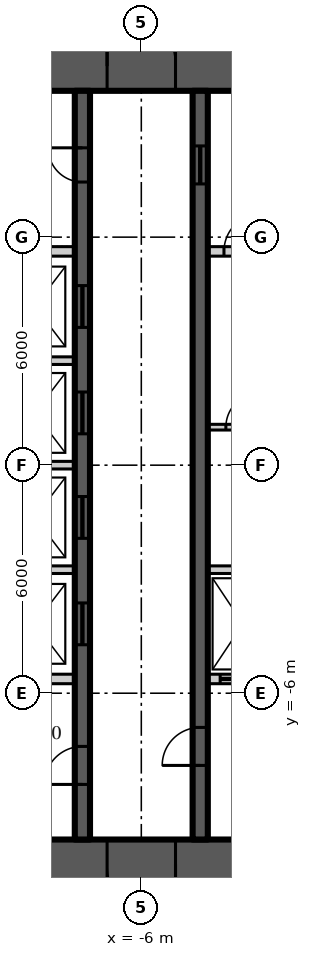
"""IFC4 building model, lengths in metres.
Left out: names, types, materials, properties, quantities, classifications, styles, units other than length and angle.
Written with IfcOpenShell. Run it as: python <this file> out.ifc"""

import sys

from ifc_helpers import new_model, si_unit, direction, frame, frame_2d, origin, place, context, subcontext, project, spatial, rectangle, extrude, element, fill, save


model = new_model("IFC4")
c1 = context("Model", 3, precision=1e-05, world=origin(), true_north=direction((0.0, 1.0)))
c2 = subcontext(c1, "Body", "Model", "MODEL_VIEW")
j1 = project(units=[si_unit("LENGTHUNIT", "METRE"), si_unit("PLANEANGLEUNIT", "RADIAN")], contexts=[c1])
p1 = place(None, origin())
s1 = spatial("IfcSite", under=j1, at=p1, CompositionType="ELEMENT")
p2 = place(p1, origin())
s2 = spatial("IfcBuilding", under=s1, at=p2, CompositionType="ELEMENT")
p3 = place(p2, frame((0.0, 0.0, 43.5)))
s3 = spatial("IfcBuildingStorey", under=s2, at=p3, CompositionType="ELEMENT", Elevation=43.5)
p4 = place(p3, frame((-11.15, 10.5, 0.0), z_axis=(0.0, 0.0, 1.0), x_axis=(1.0, 0.0, 0.0)))
e1 = element("IfcWall", 1, at=p4, inside=s3, PredefinedType="SHEAR", context=c2, shape_type="SweptSolid", body=[
    extrude(rectangle(XDim=22.3, YDim=1.3, at=frame_2d((11.15, 0.0))), origin(), (0.0, 0.0, 1.0), 3.9),
])
p5 = place(p4, frame((4.25, 0.0, 0.0)))
e2 = element("IfcOpeningElement", 2, at=p5, cuts=e1, PredefinedType="OPENING", context=c2, shape_type="SweptSolid", body=[
    extrude(rectangle(XDim=1.8, YDim=2.2, at=frame_2d((0.9, 1.1))), frame((0.0, 0.66, 0.0), z_axis=(0.0, -1.0, 0.0), x_axis=(1.0, 0.0, 0.0)), (0.0, 0.0, 1.0), 1.32),
])
p6 = place(p4, frame((16.25, 0.0, 0.0)))
e3 = element("IfcOpeningElement", 3, at=p6, cuts=e1, PredefinedType="OPENING", context=c2, shape_type="SweptSolid", body=[
    extrude(rectangle(XDim=1.8, YDim=2.2, at=frame_2d((0.9, 1.1))), frame((0.0, 0.66, 0.0), z_axis=(0.0, -1.0, 0.0), x_axis=(1.0, 0.0, 0.0)), (0.0, 0.0, 1.0), 1.32),
])
p7 = place(p3, frame((11.15, -10.5, 0.0), z_axis=(0.0, 0.0, 1.0), x_axis=(-1.0, 0.0, 0.0)))
e4 = element("IfcWall", 4, at=p7, inside=s3, PredefinedType="SHEAR", context=c2, shape_type="SweptSolid", body=[
    extrude(rectangle(XDim=22.3, YDim=1.3, at=frame_2d((11.15, 0.0))), origin(), (0.0, 0.0, 1.0), 3.9),
])
p8 = place(p7, frame((16.25, 0.0, 0.0)))
e5 = element("IfcOpeningElement", 5, at=p8, cuts=e4, PredefinedType="OPENING", context=c2, shape_type="SweptSolid", body=[
    extrude(rectangle(XDim=1.8, YDim=2.2, at=frame_2d((0.9, 1.1))), frame((0.0, 0.66, 0.0), z_axis=(0.0, -1.0, 0.0), x_axis=(1.0, 0.0, 0.0)), (0.0, 0.0, 1.0), 1.32),
])
p9 = place(p7, frame((4.25, 0.0, 0.0)))
e6 = element("IfcOpeningElement", 6, at=p9, cuts=e4, PredefinedType="OPENING", context=c2, shape_type="SweptSolid", body=[
    extrude(rectangle(XDim=1.8, YDim=2.2, at=frame_2d((0.9, 1.1))), frame((0.0, 0.66, 0.0), z_axis=(0.0, -1.0, 0.0), x_axis=(1.0, 0.0, 0.0)), (0.0, 0.0, 1.0), 1.32),
])
p10 = place(p3, frame((-7.55, -9.85, 0.0), z_axis=(0.0, 0.0, 1.0), x_axis=(0.0, 1.0, 0.0)))
e7 = element("IfcWall", 7, at=p10, inside=s3, PredefinedType="SHEAR", context=c2, shape_type="SweptSolid", body=[
    extrude(rectangle(XDim=19.7, YDim=0.4, at=frame_2d((9.85, 0.0))), origin(), (0.0, 0.0, 1.0), 3.9),
])
p11 = place(p10, frame((1.45, 0.0, 0.0)))
e8 = element("IfcOpeningElement", 8, at=p11, cuts=e7, PredefinedType="OPENING", context=c2, shape_type="SweptSolid", body=[
    extrude(rectangle(XDim=1.0, YDim=2.2, at=frame_2d((0.5, 1.1))), frame((0.0, 0.21, 0.0), z_axis=(0.0, -1.0, 0.0), x_axis=(1.0, 0.0, 0.0)), (0.0, 0.0, 1.0), 0.42),
])
p12 = place(p10, frame((17.3, 0.0, 0.0)))
e9 = element("IfcOpeningElement", 9, at=p12, cuts=e7, PredefinedType="OPENING", context=c2, shape_type="SweptSolid", body=[
    extrude(rectangle(XDim=0.9, YDim=2.1, at=frame_2d((0.45, 1.05))), frame((0.0, 0.21, 0.0), z_axis=(0.0, -1.0, 0.0), x_axis=(1.0, 0.0, 0.0)), (0.0, 0.0, 1.0), 0.42),
])
p13 = place(p10, frame((5.125, 0.0, 0.0)))
e10 = element("IfcOpeningElement", 10, at=p13, cuts=e7, PredefinedType="OPENING", context=c2, shape_type="SweptSolid", body=[
    extrude(rectangle(XDim=1.1, YDim=2.2, at=frame_2d((0.55, 1.1))), frame((0.0, 0.21, 0.0), z_axis=(0.0, -1.0, 0.0), x_axis=(1.0, 0.0, 0.0)), (0.0, 0.0, 1.0), 0.42),
])
p14 = place(p10, frame((7.925, 0.0, 0.0)))
e11 = element("IfcOpeningElement", 11, at=p14, cuts=e7, PredefinedType="OPENING", context=c2, shape_type="SweptSolid", body=[
    extrude(rectangle(XDim=1.1, YDim=2.2, at=frame_2d((0.55, 1.1))), frame((0.0, 0.21, 0.0), z_axis=(0.0, -1.0, 0.0), x_axis=(1.0, 0.0, 0.0)), (0.0, 0.0, 1.0), 0.42),
])
p15 = place(p10, frame((10.675, 0.0, 0.0)))
e12 = element("IfcOpeningElement", 12, at=p15, cuts=e7, PredefinedType="OPENING", context=c2, shape_type="SweptSolid", body=[
    extrude(rectangle(XDim=1.1, YDim=2.2, at=frame_2d((0.55, 1.1))), frame((0.0, 0.21, 0.0), z_axis=(0.0, -1.0, 0.0), x_axis=(1.0, 0.0, 0.0)), (0.0, 0.0, 1.0), 0.42),
])
p16 = place(p10, frame((13.475, 0.0, 0.0)))
e13 = element("IfcOpeningElement", 13, at=p16, cuts=e7, PredefinedType="OPENING", context=c2, shape_type="SweptSolid", body=[
    extrude(rectangle(XDim=1.1, YDim=2.2, at=frame_2d((0.55, 1.1))), frame((0.0, 0.21, 0.0), z_axis=(0.0, -1.0, 0.0), x_axis=(1.0, 0.0, 0.0)), (0.0, 0.0, 1.0), 0.42),
])
p17 = place(p3, frame((-4.45, -9.85, 0.0), z_axis=(0.0, 0.0, 1.0), x_axis=(0.0, 1.0, 0.0)))
e14 = element("IfcWall", 14, at=p17, inside=s3, PredefinedType="SHEAR", context=c2, shape_type="SweptSolid", body=[
    extrude(rectangle(XDim=19.7, YDim=0.4, at=frame_2d((9.85, 0.0))), origin(), (0.0, 0.0, 1.0), 3.9),
])
p18 = place(p17, frame((1.95, 0.0, 0.0)))
e15 = element("IfcOpeningElement", 15, at=p18, cuts=e14, PredefinedType="OPENING", context=c2, shape_type="SweptSolid", body=[
    extrude(rectangle(XDim=1.0, YDim=2.2, at=frame_2d((0.5, 1.1))), frame((0.0, 0.21, 0.0), z_axis=(0.0, -1.0, 0.0), x_axis=(1.0, 0.0, 0.0)), (0.0, 0.0, 1.0), 0.42),
])
p19 = place(p17, frame((17.25, 0.0, 0.0)))
e16 = element("IfcOpeningElement", 16, at=p19, cuts=e14, PredefinedType="OPENING", context=c2, shape_type="SweptSolid", body=[
    extrude(rectangle(XDim=1.0, YDim=2.1, at=frame_2d((0.5, 1.05))), frame((0.0, 0.21, 0.0), z_axis=(0.0, -1.0, 0.0), x_axis=(1.0, 0.0, 0.0)), (0.0, 0.0, 1.0), 0.42),
])
p20 = place(p3, frame((-9.85, 5.625, 0.0), z_axis=(0.0, 0.0, 1.0), x_axis=(1.0, 0.0, 0.0)))
e17 = element("IfcWall", 17, at=p20, inside=s3, PredefinedType="SOLIDWALL", context=c2, shape_type="SweptSolid", body=[
    extrude(rectangle(XDim=2.1, YDim=0.25, at=frame_2d((1.05, 0.0))), origin(), (0.0, 0.0, 1.0), 3.7),
])
p21 = place(p3, frame((-4.25, 5.625, 0.0), z_axis=(0.0, 0.0, 1.0), x_axis=(1.0, 0.0, 0.0)))
e18 = element("IfcWall", 18, at=p21, inside=s3, PredefinedType="SOLIDWALL", context=c2, shape_type="SweptSolid", body=[
    extrude(rectangle(XDim=1.85, YDim=0.25, at=frame_2d((0.925, 0.0))), origin(), (0.0, 0.0, 1.0), 3.7),
])
p22 = place(p21, frame((0.425, 0.0, 0.0)))
e19 = element("IfcOpeningElement", 19, at=p22, cuts=e18, PredefinedType="OPENING", context=c2, shape_type="SweptSolid", body=[
    extrude(rectangle(XDim=1.0, YDim=2.2, at=frame_2d((0.5, 1.1))), frame((0.0, 0.135, 0.0), z_axis=(0.0, -1.0, 0.0), x_axis=(1.0, 0.0, 0.0)), (0.0, 0.0, 1.0), 0.27),
])
p23 = place(p3, frame((-9.85, -5.625, 0.0), z_axis=(0.0, 0.0, 1.0), x_axis=(1.0, 0.0, 0.0)))
e20 = element("IfcWall", 20, at=p23, inside=s3, PredefinedType="SOLIDWALL", context=c2, shape_type="SweptSolid", body=[
    extrude(rectangle(XDim=2.1, YDim=0.25, at=frame_2d((1.05, 0.0))), origin(), (0.0, 0.0, 1.0), 3.7),
])
p24 = place(p3, frame((-4.25, -5.625, 0.0), z_axis=(0.0, 0.0, 1.0), x_axis=(1.0, 0.0, 0.0)))
e21 = element("IfcWall", 21, at=p24, inside=s3, PredefinedType="SOLIDWALL", context=c2, shape_type="SweptSolid", body=[
    extrude(rectangle(XDim=1.85, YDim=0.25, at=frame_2d((0.925, 0.0))), origin(), (0.0, 0.0, 1.0), 3.7),
])
p25 = place(p24, frame((0.325, 0.0, 0.0)))
e22 = element("IfcOpeningElement", 22, at=p25, cuts=e21, PredefinedType="OPENING", context=c2, shape_type="SweptSolid", body=[
    extrude(rectangle(XDim=1.2, YDim=2.2, at=frame_2d((0.6, 1.1))), frame((0.0, 0.135, 0.0), z_axis=(0.0, -1.0, 0.0), x_axis=(1.0, 0.0, 0.0)), (0.0, 0.0, 1.0), 0.27),
])
p26 = place(p3, frame((-9.85, -2.75, 0.0), z_axis=(0.0, 0.0, 1.0), x_axis=(1.0, 0.0, 0.0)))
e23 = element("IfcWall", 23, at=p26, inside=s3, PredefinedType="SOLIDWALL", context=c2, shape_type="SweptSolid", body=[
    extrude(rectangle(XDim=2.1, YDim=0.2, at=frame_2d((1.05, 0.0))), origin(), (0.0, 0.0, 1.0), 3.7),
])
p27 = place(p3, frame((-4.25, -2.75, 0.0), z_axis=(0.0, 0.0, 1.0), x_axis=(1.0, 0.0, 0.0)))
e24 = element("IfcWall", 24, at=p27, inside=s3, PredefinedType="SOLIDWALL", context=c2, shape_type="SweptSolid", body=[
    extrude(rectangle(XDim=1.85, YDim=0.2, at=frame_2d((0.925, 0.0))), origin(), (0.0, 0.0, 1.0), 3.7),
])
for number, where, z_axis, x_axis in (
    (25, (-9.85, 0.0, 0.0), (0.0, 0.0, 1.0), (1.0, 0.0, 0.0)),
    (26, (-9.85, 2.75, 0.0), (0.0, 0.0, 1.0), (1.0, 0.0, 0.0)),
):
    element("IfcWall", number, at=place(p3, frame(where, z_axis=z_axis, x_axis=x_axis)), inside=s3, PredefinedType="SOLIDWALL", context=c2, shape_type="SweptSolid", body=[
        extrude(rectangle(XDim=2.1, YDim=0.2, at=frame_2d((1.05, 0.0))), origin(), (0.0, 0.0, 1.0), 3.7),
    ])
p28 = place(p3, frame((-4.25, 1.0, 0.0), z_axis=(0.0, 0.0, 1.0), x_axis=(1.0, 0.0, 0.0)))
e27 = element("IfcWall", 27, at=p28, inside=s3, PredefinedType="SOLIDWALL", context=c2, shape_type="SweptSolid", body=[
    extrude(rectangle(XDim=1.85, YDim=0.15, at=frame_2d((0.925, 0.0))), origin(), (0.0, 0.0, 1.0), 3.77),
])
p29 = place(p28, frame((0.475, 0.0, 0.0)))
e28 = element("IfcOpeningElement", 28, at=p29, cuts=e27, PredefinedType="OPENING", context=c2, shape_type="SweptSolid", body=[
    extrude(rectangle(XDim=0.9, YDim=2.1, at=frame_2d((0.45, 1.05))), frame((0.0, 0.085, 0.0), z_axis=(0.0, -1.0, 0.0), x_axis=(1.0, 0.0, 0.0)), (0.0, 0.0, 1.0), 0.17),
])
p30 = place(p5, origin())
e29 = element("IfcDoor", 29, at=p30, inside=s3, OperationType="DOUBLE_DOOR_DOUBLE_SWING", PredefinedType="DOOR", context=c2, shape_type="SweptSolid", body=[
    extrude(rectangle(XDim=1.8, YDim=2.2, at=frame_2d((0.9, 1.1))), frame((0.0, 0.025, 0.0), z_axis=(0.0, -1.0, 0.0), x_axis=(1.0, 0.0, 0.0)), (0.0, 0.0, 1.0), 0.05),
])
fill(e2, e29)
p31 = place(p8, origin())
e30 = element("IfcDoor", 30, at=p31, inside=s3, OperationType="DOUBLE_DOOR_DOUBLE_SWING", PredefinedType="DOOR", context=c2, shape_type="SweptSolid", body=[
    extrude(rectangle(XDim=1.8, YDim=2.2, at=frame_2d((0.9, 1.1))), frame((0.0, 0.025, 0.0), z_axis=(0.0, -1.0, 0.0), x_axis=(1.0, 0.0, 0.0)), (0.0, 0.0, 1.0), 0.05),
])
fill(e5, e30)
p32 = place(p11, origin())
e31 = element("IfcDoor", 31, at=p32, inside=s3, OperationType="SINGLE_SWING_LEFT", PredefinedType="DOOR", context=c2, shape_type="SweptSolid", body=[
    extrude(rectangle(XDim=1.0, YDim=2.2, at=frame_2d((0.5, 1.1))), frame((0.0, 0.025, 0.0), z_axis=(0.0, -1.0, 0.0), x_axis=(1.0, 0.0, 0.0)), (0.0, 0.0, 1.0), 0.05),
])
fill(e8, e31)
p33 = place(p18, origin())
e32 = element("IfcDoor", 32, at=p33, inside=s3, OperationType="SINGLE_SWING_LEFT", PredefinedType="DOOR", context=c2, shape_type="SweptSolid", body=[
    extrude(rectangle(XDim=1.0, YDim=2.2, at=frame_2d((0.5, 1.1))), frame((0.0, 0.025, 0.0), z_axis=(0.0, -1.0, 0.0), x_axis=(1.0, 0.0, 0.0)), (0.0, 0.0, 1.0), 0.05),
])
fill(e15, e32)
p34 = place(p12, origin())
e33 = element("IfcDoor", 33, at=p34, inside=s3, OperationType="SINGLE_SWING_RIGHT", PredefinedType="DOOR", context=c2, shape_type="SweptSolid", body=[
    extrude(rectangle(XDim=0.9, YDim=2.1, at=frame_2d((0.45, 1.05))), frame((0.0, 0.025, 0.0), z_axis=(0.0, -1.0, 0.0), x_axis=(1.0, 0.0, 0.0)), (0.0, 0.0, 1.0), 0.05),
])
fill(e9, e33)
p35 = place(p19, origin())
e34 = element("IfcDoor", 34, at=p35, inside=s3, OperationType="SLIDING_TO_LEFT", PredefinedType="DOOR", context=c2, shape_type="SweptSolid", body=[
    extrude(rectangle(XDim=1.0, YDim=2.1, at=frame_2d((0.5, 1.05))), frame((0.0, 0.025, 0.0), z_axis=(0.0, -1.0, 0.0), x_axis=(1.0, 0.0, 0.0)), (0.0, 0.0, 1.0), 0.05),
])
fill(e16, e34)
p36 = place(p13, origin())
e35 = element("IfcDoor", 35, at=p36, inside=s3, OperationType="SLIDING_TO_LEFT", PredefinedType="DOOR", context=c2, shape_type="SweptSolid", body=[
    extrude(rectangle(XDim=1.1, YDim=2.2, at=frame_2d((0.55, 1.1))), frame((0.0, 0.025, 0.0), z_axis=(0.0, -1.0, 0.0), x_axis=(1.0, 0.0, 0.0)), (0.0, 0.0, 1.0), 0.05),
])
fill(e10, e35)
p37 = place(p14, origin())
e36 = element("IfcDoor", 36, at=p37, inside=s3, OperationType="SLIDING_TO_LEFT", PredefinedType="DOOR", context=c2, shape_type="SweptSolid", body=[
    extrude(rectangle(XDim=1.1, YDim=2.2, at=frame_2d((0.55, 1.1))), frame((0.0, 0.025, 0.0), z_axis=(0.0, -1.0, 0.0), x_axis=(1.0, 0.0, 0.0)), (0.0, 0.0, 1.0), 0.05),
])
fill(e11, e36)
p38 = place(p15, origin())
e37 = element("IfcDoor", 37, at=p38, inside=s3, OperationType="SLIDING_TO_LEFT", PredefinedType="DOOR", context=c2, shape_type="SweptSolid", body=[
    extrude(rectangle(XDim=1.1, YDim=2.2, at=frame_2d((0.55, 1.1))), frame((0.0, 0.025, 0.0), z_axis=(0.0, -1.0, 0.0), x_axis=(1.0, 0.0, 0.0)), (0.0, 0.0, 1.0), 0.05),
])
fill(e12, e37)
p39 = place(p16, origin())
e38 = element("IfcDoor", 38, at=p39, inside=s3, OperationType="SLIDING_TO_LEFT", PredefinedType="DOOR", context=c2, shape_type="SweptSolid", body=[
    extrude(rectangle(XDim=1.1, YDim=2.2, at=frame_2d((0.55, 1.1))), frame((0.0, 0.025, 0.0), z_axis=(0.0, -1.0, 0.0), x_axis=(1.0, 0.0, 0.0)), (0.0, 0.0, 1.0), 0.05),
])
fill(e13, e38)
p40 = place(p25, origin())
e39 = element("IfcDoor", 39, at=p40, inside=s3, OperationType="SLIDING_TO_LEFT", PredefinedType="DOOR", context=c2, shape_type="SweptSolid", body=[
    extrude(rectangle(XDim=1.2, YDim=2.2, at=frame_2d((0.6, 1.1))), frame((0.0, 0.025, 0.0), z_axis=(0.0, -1.0, 0.0), x_axis=(1.0, 0.0, 0.0)), (0.0, 0.0, 1.0), 0.05),
])
fill(e22, e39)
p41 = place(p29, origin())
e40 = element("IfcDoor", 40, at=p41, inside=s3, OperationType="SINGLE_SWING_RIGHT", PredefinedType="DOOR", context=c2, shape_type="SweptSolid", body=[
    extrude(rectangle(XDim=0.9, YDim=2.1, at=frame_2d((0.45, 1.05))), frame((0.0, 0.025, 0.0), z_axis=(0.0, -1.0, 0.0), x_axis=(1.0, 0.0, 0.0)), (0.0, 0.0, 1.0), 0.05),
])
fill(e28, e40)
p42 = place(p22, origin())
e41 = element("IfcDoor", 41, at=p42, inside=s3, OperationType="SINGLE_SWING_RIGHT", PredefinedType="DOOR", context=c2, shape_type="SweptSolid", body=[
    extrude(rectangle(XDim=1.0, YDim=2.2, at=frame_2d((0.5, 1.1))), frame((0.0, 0.025, 0.0), z_axis=(0.0, -1.0, 0.0), x_axis=(1.0, 0.0, 0.0)), (0.0, 0.0, 1.0), 0.05),
])
fill(e19, e41)
save(model, sys.argv[1])
